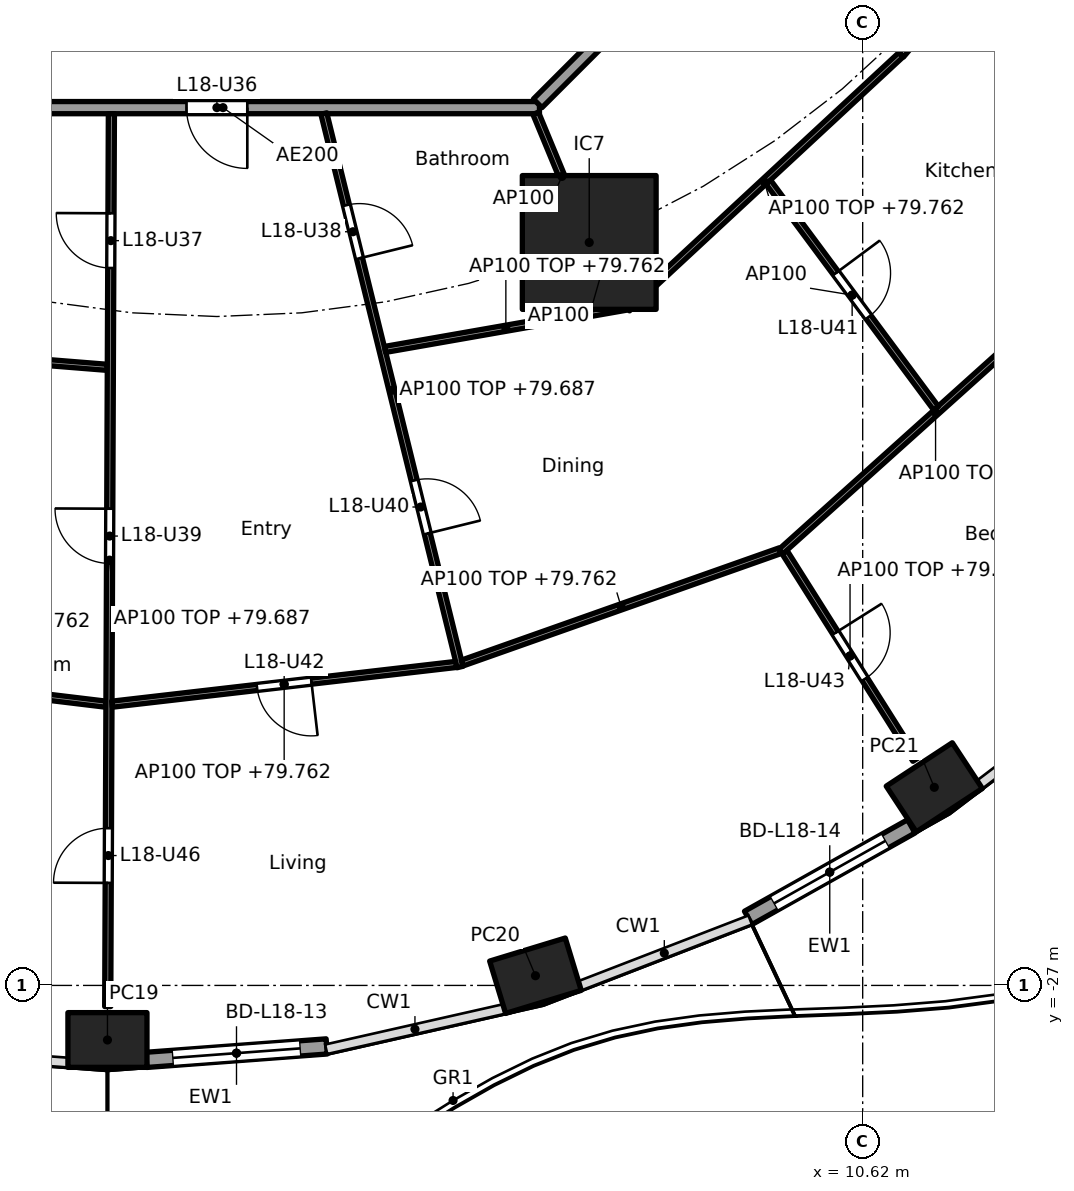
"""IFC4 building model, lengths in metres.
Left out: names, types, materials, properties, quantities, classifications, styles, units other than length and angle.
Written with IfcOpenShell. Run it as: python <this file> out.ifc"""

import sys

from ifc_helpers import new_model, si_unit, direction, frame, frame_2d, origin, origin_2d, place, context, subcontext, project, spatial, rectangle, hollow_rectangle, extrude, element, fill, save


model = new_model("IFC4")
c1 = context("Model", 3, precision=1e-05, world=origin(), true_north=direction((0.0, 1.0)))
c2 = subcontext(c1, "Body", "Model", "MODEL_VIEW")
j1 = project(units=[si_unit("LENGTHUNIT", "METRE"), si_unit("PLANEANGLEUNIT", "RADIAN")], contexts=[c1])
p1 = place(None, origin())
s1 = spatial("IfcSite", under=j1, at=p1, CompositionType="ELEMENT")
p2 = place(p1, origin())
s2 = spatial("IfcBuilding", under=s1, at=p2, CompositionType="ELEMENT")
p3 = place(p2, frame((0.0, 0.0, 77.0)))
s3 = spatial("IfcBuildingStorey", under=s2, at=p3, CompositionType="ELEMENT", Elevation=77.0)
for number, where, z_axis, x_axis in (
    (1, (-1.8, -27.897, 0.0), (0.0, 0.0, 1.0), (1.0, 0.0, 0.0)),
    (2, (5.239, -26.841, 0.0), (0.0, 0.0, 1.0), (0.957, 0.292, 0.0)),
    (3, (11.798, -23.742, 0.0), (0.0, 0.0, 1.0), (0.836, 0.549, 0.0)),
):
    element("IfcColumn", number, at=place(p3, frame(where, z_axis=z_axis, x_axis=x_axis)), inside=s3, PredefinedType="COLUMN", context=c2, shape_type="SweptSolid", body=[
        extrude(hollow_rectangle(XDim=1.3, YDim=0.9, WallThickness=0.045, at=origin_2d()), origin(), (0.0, 0.0, 1.0), 3.7),
    ])
p4 = place(p3, frame((6.123, -14.782, 0.0), z_axis=(0.0, 0.0, 1.0), x_axis=(1.0, 0.0, 0.0)))
e4 = element("IfcColumn", 4, at=p4, inside=s3, PredefinedType="COLUMN", context=c2, shape_type="SweptSolid", body=[
    extrude(rectangle(XDim=2.2, YDim=2.2, at=origin_2d()), origin(), (0.0, 0.0, 1.0), 3.7),
])
p5 = place(p3, frame((1.806, -28.003, 0.0), z_axis=(0.0, 0.0, 1.0), x_axis=(-0.997226174467, -0.074430887117, 0.0)))
e5 = element("IfcWall", 5, at=p5, inside=s3, PredefinedType="SOLIDWALL", context=c2, shape_type="SweptSolid", body=[
    extrude(rectangle(XDim=2.975, YDim=0.25, at=frame_2d((1.488, 0.0))), origin(), (0.0, 0.0, 1.0), 3.44),
])
p6 = place(p5, frame((0.438, 0.0, 0.0)))
e6 = element("IfcOpeningElement", 6, at=p6, cuts=e5, PredefinedType="OPENING", context=c2, shape_type="SweptSolid", body=[
    extrude(rectangle(XDim=2.1, YDim=2.4, at=frame_2d((1.05, 1.2))), frame((0.0, 0.135, 0.0), z_axis=(0.0, -1.0, 0.0), x_axis=(1.0, 0.0, 0.0)), (0.0, 0.0, 1.0), 0.27),
])
p7 = place(p3, frame((11.419, -24.384, 0.0), z_axis=(0.0, 0.0, 1.0), x_axis=(-0.872071158476, -0.489379090843, 0.0)))
e7 = element("IfcWall", 7, at=p7, inside=s3, PredefinedType="SOLIDWALL", context=c2, shape_type="SweptSolid", body=[
    extrude(rectangle(XDim=3.076, YDim=0.25, at=frame_2d((1.538, 0.0))), origin(), (0.0, 0.0, 1.0), 3.44),
])
p8 = place(p7, frame((0.488, 0.0, 0.0)))
e8 = element("IfcOpeningElement", 8, at=p8, cuts=e7, PredefinedType="OPENING", context=c2, shape_type="SweptSolid", body=[
    extrude(rectangle(XDim=2.1, YDim=2.4, at=frame_2d((1.05, 1.2))), frame((0.0, 0.135, 0.0), z_axis=(0.0, -1.0, 0.0), x_axis=(1.0, 0.0, 0.0)), (0.0, 0.0, 1.0), 0.27),
])
p9 = place(p3, frame((-5.104, -12.565, 0.0), z_axis=(0.0, 0.0, 1.0), x_axis=(1.0, 0.0, 0.0)))
e9 = element("IfcWall", 9, at=p9, inside=s3, PredefinedType="PARTITIONING", context=c2, shape_type="SweptSolid", body=[
    extrude(rectangle(XDim=10.409, YDim=0.2, at=frame_2d((5.205, 0.0))), origin(), (0.0, 0.0, 1.0), 3.44),
])
p10 = place(p9, frame((4.604, 0.0, 0.0)))
e10 = element("IfcOpeningElement", 10, at=p10, cuts=e9, PredefinedType="OPENING", context=c2, shape_type="SweptSolid", body=[
    extrude(rectangle(XDim=1.0, YDim=2.1, at=frame_2d((0.5, 1.05))), frame((0.0, 0.11, 0.0), z_axis=(0.0, -1.0, 0.0), x_axis=(1.0, 0.0, 0.0)), (0.0, 0.0, 1.0), 0.22),
])
p11 = place(p3, frame((5.275, -12.494, 0.0), z_axis=(0.0, 0.0, 1.0), x_axis=(0.707106781187, 0.707106781187, 0.0)))
e11 = element("IfcWall", 11, at=p11, inside=s3, PredefinedType="PARTITIONING", context=c2, shape_type="SweptSolid", body=[
    extrude(rectangle(XDim=10.409, YDim=0.2, at=frame_2d((5.205, 0.0))), origin(), (0.0, 0.0, 1.0), 3.44),
])
p12 = place(p3, frame((-6.404, -16.468, 0.0), z_axis=(0.0, 0.0, 1.0), x_axis=(0.996818808981, -0.079701079432, 0.0)))
e12 = element("IfcWall", 12, at=p12, inside=s3, PredefinedType="PARTITIONING", context=c2, shape_type="SweptSolid", body=[
    extrude(rectangle(XDim=4.616, YDim=0.1, at=frame_2d((2.308, 0.0))), origin(), (0.0, 0.0, 1.0), 2.762),
])
p13 = place(p3, frame((-7.586, -21.68, 0.0), z_axis=(0.0, 0.0, 1.0), x_axis=(0.992810189026, -0.119699325668, 0.0)))
e13 = element("IfcWall", 13, at=p13, inside=s3, PredefinedType="PARTITIONING", context=c2, shape_type="SweptSolid", body=[
    extrude(rectangle(XDim=5.803, YDim=0.1, at=frame_2d((2.901, 0.0))), origin(), (0.0, 0.0, 1.0), 2.762),
])
p14 = place(p13, frame((0.988, 0.0, 0.0)))
e14 = element("IfcOpeningElement", 14, at=p14, cuts=e13, PredefinedType="OPENING", context=c2, shape_type="SweptSolid", body=[
    extrude(rectangle(XDim=0.9, YDim=2.1, at=frame_2d((0.45, 1.05))), frame((0.0, 0.06, 0.0), z_axis=(0.0, -1.0, 0.0), x_axis=(1.0, 0.0, 0.0)), (0.0, 0.0, 1.0), 0.12),
])
p15 = place(p3, frame((-1.735, -12.665, 0.0), z_axis=(0.0, 0.0, 1.0), x_axis=(-0.004107048833, -0.999991566039, 0.0)))
e15 = element("IfcWall", 15, at=p15, inside=s3, PredefinedType="PARTITIONING", context=c2, shape_type="SweptSolid", body=[
    extrude(rectangle(XDim=14.683, YDim=0.1, at=frame_2d((7.341, 0.0))), origin(), (0.0, 0.0, 1.0), 2.687),
])
p16 = place(p15, frame((1.637, 0.0, 0.0)))
e16 = element("IfcOpeningElement", 16, at=p16, cuts=e15, PredefinedType="OPENING", context=c2, shape_type="SweptSolid", body=[
    extrude(rectangle(XDim=0.9, YDim=2.1, at=frame_2d((0.45, 1.05))), frame((0.0, 0.06, 0.0), z_axis=(0.0, -1.0, 0.0), x_axis=(1.0, 0.0, 0.0)), (0.0, 0.0, 1.0), 0.12),
])
p17 = place(p15, frame((6.496, 0.0, 0.0)))
e17 = element("IfcOpeningElement", 17, at=p17, cuts=e15, PredefinedType="OPENING", context=c2, shape_type="SweptSolid", body=[
    extrude(rectangle(XDim=0.9, YDim=2.1, at=frame_2d((0.45, 1.05))), frame((0.0, 0.06, 0.0), z_axis=(0.0, -1.0, 0.0), x_axis=(1.0, 0.0, 0.0)), (0.0, 0.0, 1.0), 0.12),
])
p18 = place(p15, frame((11.75, 0.0, 0.0)))
e18 = element("IfcOpeningElement", 18, at=p18, cuts=e15, PredefinedType="OPENING", context=c2, shape_type="SweptSolid", body=[
    extrude(rectangle(XDim=0.9, YDim=2.1, at=frame_2d((0.45, 1.05))), frame((0.0, 0.06, 0.0), z_axis=(0.0, -1.0, 0.0), x_axis=(1.0, 0.0, 0.0)), (0.0, 0.0, 1.0), 0.12),
])
p19 = place(p3, frame((-1.726, -22.375, 0.0), z_axis=(0.0, 0.0, 1.0), x_axis=(0.99339223329, 0.114768771187, 0.0)))
e19 = element("IfcWall", 19, at=p19, inside=s3, PredefinedType="PARTITIONING", context=c2, shape_type="SweptSolid", body=[
    extrude(rectangle(XDim=5.701, YDim=0.1, at=frame_2d((2.851, 0.0))), origin(), (0.0, 0.0, 1.0), 2.762),
])
p20 = place(p19, frame((2.4, 0.0, 0.0)))
e20 = element("IfcOpeningElement", 20, at=p20, cuts=e19, PredefinedType="OPENING", context=c2, shape_type="SweptSolid", body=[
    extrude(rectangle(XDim=0.9, YDim=2.1, at=frame_2d((0.45, 1.05))), frame((0.0, 0.06, 0.0), z_axis=(0.0, -1.0, 0.0), x_axis=(1.0, 0.0, 0.0)), (0.0, 0.0, 1.0), 0.12),
])
p21 = place(p3, frame((1.759, -12.662, 0.0), z_axis=(0.0, 0.0, 1.0), x_axis=(0.239022447434, -0.971014041929, 0.0)))
e21 = element("IfcWall", 21, at=p21, inside=s3, PredefinedType="PARTITIONING", context=c2, shape_type="SweptSolid", body=[
    extrude(rectangle(XDim=9.374, YDim=0.1, at=frame_2d((4.687, 0.0))), origin(), (0.0, 0.0, 1.0), 2.687),
])
p22 = place(p21, frame((1.552, 0.0, 0.0)))
e22 = element("IfcOpeningElement", 22, at=p22, cuts=e21, PredefinedType="OPENING", context=c2, shape_type="SweptSolid", body=[
    extrude(rectangle(XDim=0.9, YDim=2.1, at=frame_2d((0.45, 1.05))), frame((0.0, 0.06, 0.0), z_axis=(0.0, -1.0, 0.0), x_axis=(1.0, 0.0, 0.0)), (0.0, 0.0, 1.0), 0.12),
])
p23 = place(p21, frame((6.214, 0.0, 0.0)))
e23 = element("IfcOpeningElement", 23, at=p23, cuts=e21, PredefinedType="OPENING", context=c2, shape_type="SweptSolid", body=[
    extrude(rectangle(XDim=0.9, YDim=2.1, at=frame_2d((0.45, 1.05))), frame((0.0, 0.06, 0.0), z_axis=(0.0, -1.0, 0.0), x_axis=(1.0, 0.0, 0.0)), (0.0, 0.0, 1.0), 0.12),
])
p24 = place(p3, frame((2.765, -16.541, 0.0), z_axis=(0.0, 0.0, 1.0), x_axis=(0.985002709003, 0.172538874623, 0.0)))
e24 = element("IfcWall", 24, at=p24, inside=s3, PredefinedType="PARTITIONING", context=c2, shape_type="SweptSolid", body=[
    extrude(rectangle(XDim=4.034, YDim=0.1, at=frame_2d((2.017, 0.0))), origin(), (0.0, 0.0, 1.0), 2.762),
])
p25 = place(p3, frame((4.034, -21.698, 0.0), z_axis=(0.0, 0.0, 1.0), x_axis=(0.942864271692, 0.333177077794, 0.0)))
e25 = element("IfcWall", 25, at=p25, inside=s3, PredefinedType="PARTITIONING", context=c2, shape_type="SweptSolid", body=[
    extrude(rectangle(XDim=5.545, YDim=0.1, at=frame_2d((2.772, 0.0))), origin(), (0.0, 0.0, 1.0), 2.762),
])
p26 = place(p3, frame((5.243, -12.657, 0.0), z_axis=(0.0, 0.0, 1.0), x_axis=(0.382719158442, -0.923864733477, 0.0)))
e26 = element("IfcWall", 26, at=p26, inside=s3, PredefinedType="PARTITIONING", context=c2, shape_type="SweptSolid", body=[
    extrude(rectangle(XDim=2.25, YDim=0.1, at=frame_2d((1.125, 0.0))), origin(), (0.0, 0.0, 1.0), 3.44),
])
p27 = place(p3, frame((6.751, -15.87, 0.0), z_axis=(0.0, 0.0, 1.0), x_axis=(0.733003105791, 0.680225291283, 0.0)))
e27 = element("IfcWall", 27, at=p27, inside=s3, PredefinedType="PARTITIONING", context=c2, shape_type="SweptSolid", body=[
    extrude(rectangle(XDim=6.138, YDim=0.1, at=frame_2d((3.069, 0.0))), origin(), (0.0, 0.0, 1.0), 2.762),
])
p28 = place(p3, frame((9.336, -19.877, 0.0), z_axis=(0.0, 0.0, 1.0), x_axis=(0.533525984139, -0.845783674617, 0.0)))
e28 = element("IfcWall", 28, at=p28, inside=s3, PredefinedType="PARTITIONING", context=c2, shape_type="SweptSolid", body=[
    extrude(rectangle(XDim=4.033, YDim=0.1, at=frame_2d((2.016, 0.0))), origin(), (0.0, 0.0, 1.0), 2.762),
])
p29 = place(p28, frame((1.566, 0.0, 0.0)))
e29 = element("IfcOpeningElement", 29, at=p29, cuts=e28, PredefinedType="OPENING", context=c2, shape_type="SweptSolid", body=[
    extrude(rectangle(XDim=0.9, YDim=2.1, at=frame_2d((0.45, 1.05))), frame((0.0, 0.06, 0.0), z_axis=(0.0, -1.0, 0.0), x_axis=(1.0, 0.0, 0.0)), (0.0, 0.0, 1.0), 0.12),
])
p30 = place(p3, frame((9.272, -19.868, 0.0), z_axis=(0.0, 0.0, 1.0), x_axis=(0.743884413566, 0.668308296562, 0.0)))
e30 = element("IfcWall", 30, at=p30, inside=s3, PredefinedType="PARTITIONING", context=c2, shape_type="SweptSolid", body=[
    extrude(rectangle(XDim=6.845, YDim=0.1, at=frame_2d((3.423, 0.0))), origin(), (0.0, 0.0, 1.0), 2.762),
])
p31 = place(p3, frame((9.067, -13.789, 0.0), z_axis=(0.0, 0.0, 1.0), x_axis=(0.5958491185, -0.80309640018, 0.0)))
e31 = element("IfcWall", 31, at=p31, inside=s3, PredefinedType="PARTITIONING", context=c2, shape_type="SweptSolid", body=[
    extrude(rectangle(XDim=4.63, YDim=0.1, at=frame_2d((2.315, 0.0))), origin(), (0.0, 0.0, 1.0), 3.44),
])
p32 = place(p31, frame((1.865, 0.0, 0.0)))
e32 = element("IfcOpeningElement", 32, at=p32, cuts=e31, PredefinedType="OPENING", context=c2, shape_type="SweptSolid", body=[
    extrude(rectangle(XDim=0.9, YDim=2.1, at=frame_2d((0.45, 1.05))), frame((0.0, 0.06, 0.0), z_axis=(0.0, -1.0, 0.0), x_axis=(1.0, 0.0, 0.0)), (0.0, 0.0, 1.0), 0.12),
])
p33 = place(p3, frame((11.255, -11.699, 0.0), z_axis=(0.0, 0.0, 1.0), x_axis=(0.646107653745, 0.763246290375, 0.0)))
e33 = element("IfcWall", 33, at=p33, inside=s3, PredefinedType="PARTITIONING", context=c2, shape_type="SweptSolid", body=[
    extrude(rectangle(XDim=6.417, YDim=0.1, at=frame_2d((3.208, 0.0))), origin(), (0.0, 0.0, 1.0), 2.762),
])
p34 = place(p33, frame((2.784, 0.0, 0.0)))
e34 = element("IfcOpeningElement", 34, at=p34, cuts=e33, PredefinedType="OPENING", context=c2, shape_type="SweptSolid", body=[
    extrude(rectangle(XDim=0.9, YDim=2.1, at=frame_2d((0.45, 1.05))), frame((0.0, 0.06, 0.0), z_axis=(0.0, -1.0, 0.0), x_axis=(1.0, 0.0, 0.0)), (0.0, 0.0, 1.0), 0.12),
])
p35 = place(p3, frame((6.051, -14.855, 0.0), z_axis=(0.0, 0.0, 1.0), x_axis=(0.533542828537, -0.845773048824, 0.0)))
e35 = element("IfcWall", 35, at=p35, inside=s3, PredefinedType="PARTITIONING", context=c2, shape_type="SweptSolid", body=[
    extrude(rectangle(XDim=1.021, YDim=0.1, at=frame_2d((0.51, 0.0))), origin(), (0.0, 0.0, 1.0), 3.44),
])
p36 = place(p6, origin())
e36 = element("IfcDoor", 36, at=p36, inside=s3, OperationType="SLIDING_TO_LEFT", PredefinedType="DOOR", context=c2, shape_type="SweptSolid", body=[
    extrude(rectangle(XDim=2.1, YDim=2.4, at=frame_2d((1.05, 1.2))), frame((0.0, 0.025, 0.0), z_axis=(0.0, -1.0, 0.0), x_axis=(1.0, 0.0, 0.0)), (0.0, 0.0, 1.0), 0.05),
])
fill(e6, e36)
p37 = place(p8, origin())
e37 = element("IfcDoor", 37, at=p37, inside=s3, OperationType="SLIDING_TO_LEFT", PredefinedType="DOOR", context=c2, shape_type="SweptSolid", body=[
    extrude(rectangle(XDim=2.1, YDim=2.4, at=frame_2d((1.05, 1.2))), frame((0.0, 0.025, 0.0), z_axis=(0.0, -1.0, 0.0), x_axis=(1.0, 0.0, 0.0)), (0.0, 0.0, 1.0), 0.05),
])
fill(e8, e37)
p38 = place(p10, frame((1.0, 0.0, 0.0), x_axis=(-1.0, 0.0, 0.0)))
e38 = element("IfcDoor", 38, at=p38, inside=s3, OperationType="SINGLE_SWING_LEFT", PredefinedType="DOOR", context=c2, shape_type="SweptSolid", body=[
    extrude(rectangle(XDim=1.0, YDim=2.1, at=frame_2d((0.5, 1.05))), frame((0.0, 0.025, 0.0), z_axis=(0.0, -1.0, 0.0), x_axis=(1.0, 0.0, 0.0)), (0.0, 0.0, 1.0), 0.05),
])
fill(e10, e38)
p39 = place(p16, frame((0.9, 0.0, 0.0), x_axis=(-1.0, 0.0, 0.0)))
e39 = element("IfcDoor", 39, at=p39, inside=s3, OperationType="SINGLE_SWING_RIGHT", PredefinedType="DOOR", context=c2, shape_type="SweptSolid", body=[
    extrude(rectangle(XDim=0.9, YDim=2.1, at=frame_2d((0.45, 1.05))), frame((0.0, 0.025, 0.0), z_axis=(0.0, -1.0, 0.0), x_axis=(1.0, 0.0, 0.0)), (0.0, 0.0, 1.0), 0.05),
])
fill(e16, e39)
p40 = place(p22, origin())
e40 = element("IfcDoor", 40, at=p40, inside=s3, OperationType="SINGLE_SWING_RIGHT", PredefinedType="DOOR", context=c2, shape_type="SweptSolid", body=[
    extrude(rectangle(XDim=0.9, YDim=2.1, at=frame_2d((0.45, 1.05))), frame((0.0, 0.025, 0.0), z_axis=(0.0, -1.0, 0.0), x_axis=(1.0, 0.0, 0.0)), (0.0, 0.0, 1.0), 0.05),
])
fill(e22, e40)
p41 = place(p17, frame((0.9, 0.0, 0.0), x_axis=(-1.0, 0.0, 0.0)))
e41 = element("IfcDoor", 41, at=p41, inside=s3, OperationType="SINGLE_SWING_RIGHT", PredefinedType="DOOR", context=c2, shape_type="SweptSolid", body=[
    extrude(rectangle(XDim=0.9, YDim=2.1, at=frame_2d((0.45, 1.05))), frame((0.0, 0.025, 0.0), z_axis=(0.0, -1.0, 0.0), x_axis=(1.0, 0.0, 0.0)), (0.0, 0.0, 1.0), 0.05),
])
fill(e17, e41)
p42 = place(p23, origin())
e42 = element("IfcDoor", 42, at=p42, inside=s3, OperationType="SINGLE_SWING_RIGHT", PredefinedType="DOOR", context=c2, shape_type="SweptSolid", body=[
    extrude(rectangle(XDim=0.9, YDim=2.1, at=frame_2d((0.45, 1.05))), frame((0.0, 0.025, 0.0), z_axis=(0.0, -1.0, 0.0), x_axis=(1.0, 0.0, 0.0)), (0.0, 0.0, 1.0), 0.05),
])
fill(e23, e42)
p43 = place(p32, origin())
e43 = element("IfcDoor", 43, at=p43, inside=s3, OperationType="SINGLE_SWING_LEFT", PredefinedType="DOOR", context=c2, shape_type="SweptSolid", body=[
    extrude(rectangle(XDim=0.9, YDim=2.1, at=frame_2d((0.45, 1.05))), frame((0.0, 0.025, 0.0), z_axis=(0.0, -1.0, 0.0), x_axis=(1.0, 0.0, 0.0)), (0.0, 0.0, 1.0), 0.05),
])
fill(e32, e43)
p44 = place(p20, frame((0.9, 0.0, 0.0), x_axis=(-1.0, 0.0, 0.0)))
e44 = element("IfcDoor", 44, at=p44, inside=s3, OperationType="SINGLE_SWING_LEFT", PredefinedType="DOOR", context=c2, shape_type="SweptSolid", body=[
    extrude(rectangle(XDim=0.9, YDim=2.1, at=frame_2d((0.45, 1.05))), frame((0.0, 0.025, 0.0), z_axis=(0.0, -1.0, 0.0), x_axis=(1.0, 0.0, 0.0)), (0.0, 0.0, 1.0), 0.05),
])
fill(e20, e44)
p45 = place(p29, origin())
e45 = element("IfcDoor", 45, at=p45, inside=s3, OperationType="SINGLE_SWING_LEFT", PredefinedType="DOOR", context=c2, shape_type="SweptSolid", body=[
    extrude(rectangle(XDim=0.9, YDim=2.1, at=frame_2d((0.45, 1.05))), frame((0.0, 0.025, 0.0), z_axis=(0.0, -1.0, 0.0), x_axis=(1.0, 0.0, 0.0)), (0.0, 0.0, 1.0), 0.05),
])
fill(e29, e45)
p46 = place(p18, frame((0.9, 0.0, 0.0), x_axis=(-1.0, 0.0, 0.0)))
e46 = element("IfcDoor", 46, at=p46, inside=s3, OperationType="SINGLE_SWING_LEFT", PredefinedType="DOOR", context=c2, shape_type="SweptSolid", body=[
    extrude(rectangle(XDim=0.9, YDim=2.1, at=frame_2d((0.45, 1.05))), frame((0.0, 0.025, 0.0), z_axis=(0.0, -1.0, 0.0), x_axis=(1.0, 0.0, 0.0)), (0.0, 0.0, 1.0), 0.05),
])
fill(e18, e46)
save(model, sys.argv[1])
